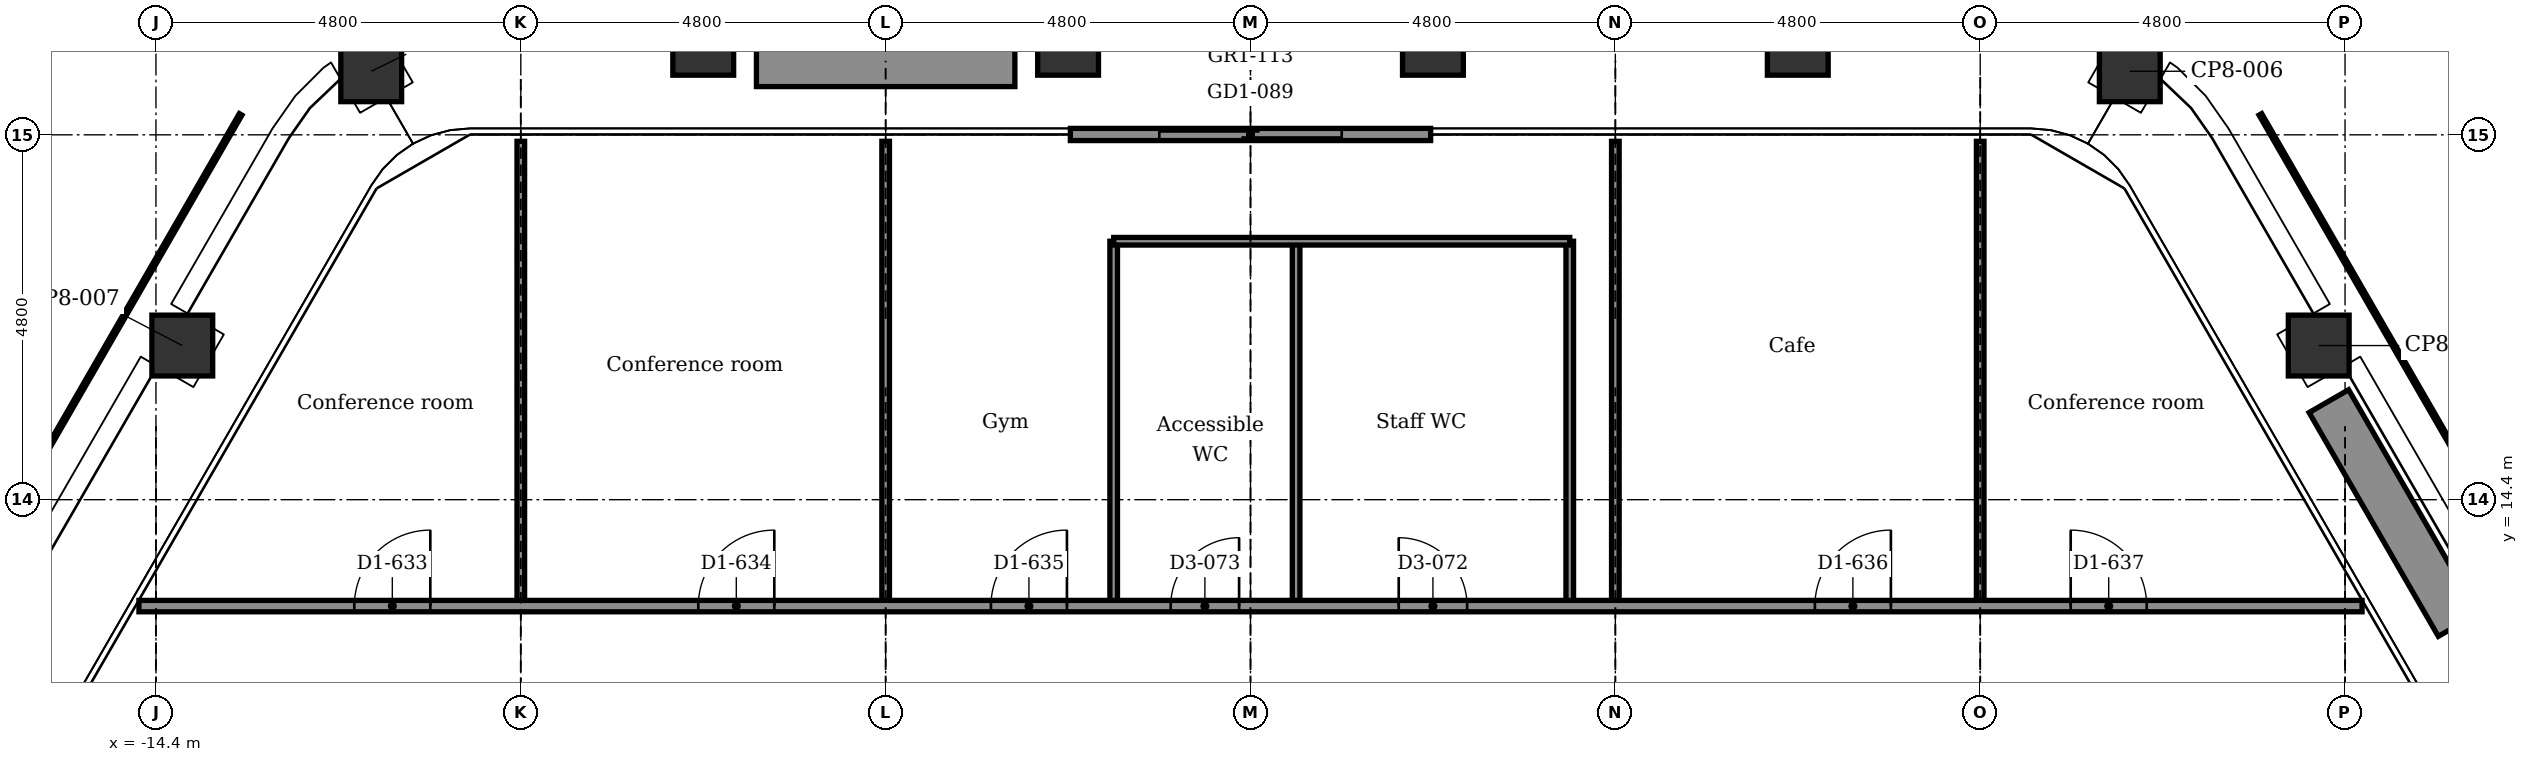
"""IFC4 building model, lengths in metres.
Left out: names, types, materials, properties, quantities, classifications, styles, units other than length and angle.
Written with IfcOpenShell. Run it as: python <this file> out.ifc"""

import sys

from ifc_helpers import new_model, si_unit, direction, frame, frame_2d, origin, origin_2d, place, context, subcontext, project, spatial, rectangle, extrude, element, fill, save


model = new_model("IFC4")
c1 = context("Model", 3, precision=1e-05, world=origin(), true_north=direction((0.0, 1.0)))
c2 = subcontext(c1, "Body", "Model", "MODEL_VIEW")
j1 = project(units=[si_unit("LENGTHUNIT", "METRE"), si_unit("PLANEANGLEUNIT", "RADIAN")], contexts=[c1])
p1 = place(None, origin())
s1 = spatial("IfcSite", under=j1, at=p1, CompositionType="ELEMENT")
p2 = place(p1, origin())
s2 = spatial("IfcBuilding", under=s1, at=p2, CompositionType="ELEMENT")
p3 = place(p2, frame((0.0, 0.0, 222.8)))
s3 = spatial("IfcBuildingStorey", under=s2, at=p3, CompositionType="ELEMENT", Elevation=222.8)
for number, where, z_axis, x_axis in (
    (1, (-11.568, 20.036, -0.15), (0.0, 0.0, 1.0), (0.866, 0.5, 0.0)),
    (2, (-7.2, 20.385, -0.15), (0.0, 0.0, 1.0), (1.0, 0.0, 0.0)),
    (3, (-2.4, 20.385, -0.15), (0.0, 0.0, 1.0), (1.0, 0.0, 0.0)),
    (4, (2.4, 20.385, -0.15), (0.0, 0.0, 1.0), (1.0, 0.0, 0.0)),
    (5, (7.2, 20.385, -0.15), (0.0, 0.0, 1.0), (1.0, 0.0, 0.0)),
    (6, (11.568, 20.036, -0.15), (0.0, 0.0, 1.0), (0.5, 0.866, 0.0)),
    (7, (14.054, 16.428, -0.15), (0.0, 0.0, 1.0), (0.866, 0.5, 0.0)),
    (8, (-14.054, 16.428, -0.15), (0.0, 0.0, 1.0), (0.5, 0.866, 0.0)),
):
    element("IfcColumn", number, at=place(p3, frame(where, z_axis=z_axis, x_axis=x_axis)), inside=s3, PredefinedType="COLUMN", context=c2, shape_type="SweptSolid", body=[
        extrude(rectangle(XDim=0.8, YDim=0.8, at=origin_2d()), origin(), (0.0, 0.0, 1.0), 3.9),
    ])
p4 = place(p3, frame((-2.37, 19.205, 0.0), z_axis=(0.0, 0.0, 1.0), x_axis=(1.0, 0.0, 0.0)))
e9 = element("IfcWall", 9, at=p4, inside=s3, PredefinedType="PARTITIONING", context=c2, shape_type="SweptSolid", body=[
    extrude(rectangle(XDim=4.74, YDim=0.16, at=frame_2d((2.37, 0.0))), origin(), (0.0, 0.0, 1.0), 3.75),
])
p5 = place(p4, frame((1.17, 0.0, 0.0)))
e10 = element("IfcOpeningElement", 10, at=p5, cuts=e9, PredefinedType="OPENING", context=c2, shape_type="SweptSolid", body=[
    extrude(rectangle(XDim=2.4, YDim=2.4, at=frame_2d((1.2, 1.2))), frame((0.0, 0.09, 0.0), z_axis=(0.0, -1.0, 0.0), x_axis=(1.0, 0.0, 0.0)), (0.0, 0.0, 1.0), 0.18),
])
p6 = place(p3, frame((-6.5, 20.135, 0.0), z_axis=(0.0, 0.0, 1.0), x_axis=(1.0, 0.0, 0.0)))
e11 = element("IfcWall", 11, at=p6, inside=s3, PredefinedType="USERDEFINED", context=c2, shape_type="SweptSolid", body=[
    extrude(rectangle(XDim=3.4, YDim=0.6, at=frame_2d((1.7, 0.0))), origin(), (0.0, 0.0, 1.0), 0.7),
])
p7 = place(p3, frame((14.187, 15.697, 0.0), z_axis=(0.0, 0.0, 1.0), x_axis=(0.499977295307, -0.866038511948, 0.0)))
e12 = element("IfcWall", 12, at=p7, inside=s3, PredefinedType="USERDEFINED", context=c2, shape_type="SweptSolid", body=[
    extrude(rectangle(XDim=3.4, YDim=0.6, at=frame_2d((1.7, 0.0))), origin(), (0.0, 0.0, 1.0), 0.7),
])
for number, where, z_axis, x_axis in (
    (13, (9.6, 13.0, 0.0), (0.0, 0.0, 1.0), (0.0, 1.0, 0.0)),
    (14, (4.8, 13.0, 0.0), (0.0, 0.0, 1.0), (0.0, 1.0, 0.0)),
):
    element("IfcWall", number, at=place(p3, frame(where, z_axis=z_axis, x_axis=x_axis)), inside=s3, PredefinedType="PARTITIONING", context=c2, shape_type="SweptSolid", body=[
        extrude(rectangle(XDim=6.115, YDim=0.1, at=frame_2d((3.057, 0.0))), origin(), (0.0, 0.0, 1.0), 3.217),
    ])
for number, where, z_axis, x_axis in (
    (15, (4.2, 13.0, 0.0), (0.0, 0.0, 1.0), (0.0, 1.0, 0.0)),
    (16, (0.6, 13.0, 0.0), (0.0, 0.0, 1.0), (0.0, 1.0, 0.0)),
    (17, (-1.8, 13.0, 0.0), (0.0, 0.0, 1.0), (0.0, 1.0, 0.0)),
):
    element("IfcWall", number, at=place(p3, frame(where, z_axis=z_axis, x_axis=x_axis)), inside=s3, PredefinedType="PARTITIONING", context=c2, shape_type="SweptSolid", body=[
        extrude(rectangle(XDim=4.8, YDim=0.1, at=frame_2d((2.4, 0.0))), origin(), (0.0, 0.0, 1.0), 3.75),
    ])
p8 = place(p3, frame((-4.8, 13.0, 0.0), z_axis=(0.0, 0.0, 1.0), x_axis=(0.0, 1.0, 0.0)))
e18 = element("IfcWall", 18, at=p8, inside=s3, PredefinedType="PARTITIONING", context=c2, shape_type="SweptSolid", body=[
    extrude(rectangle(XDim=6.115, YDim=0.1, at=frame_2d((3.057, 0.0))), origin(), (0.0, 0.0, 1.0), 3.217),
])
p9 = place(p3, frame((-9.6, 13.0, 0.0), z_axis=(0.0, 0.0, 1.0), x_axis=(0.0, 1.0, 0.0)))
e19 = element("IfcWall", 19, at=p9, inside=s3, PredefinedType="PARTITIONING", context=c2, shape_type="SweptSolid", body=[
    extrude(rectangle(XDim=6.115, YDim=0.1, at=frame_2d((3.057, 0.0))), origin(), (0.0, 0.0, 1.0), 3.293),
])
p10 = place(p3, frame((-14.624, 13.0, 0.0), z_axis=(0.0, 0.0, 1.0), x_axis=(1.0, 0.0, 0.0)))
e20 = element("IfcWall", 20, at=p10, inside=s3, PredefinedType="PARTITIONING", context=c2, shape_type="SweptSolid", body=[
    extrude(rectangle(XDim=29.248, YDim=0.15, at=frame_2d((14.624, 0.0))), origin(), (0.0, 0.0, 1.0), 3.75),
])
p11 = place(p10, frame((2.833, 0.0, 0.0)))
e21 = element("IfcOpeningElement", 21, at=p11, cuts=e20, PredefinedType="OPENING", context=c2, shape_type="SweptSolid", body=[
    extrude(rectangle(XDim=1.0, YDim=2.1, at=frame_2d((0.5, 1.05))), frame((0.0, 0.085, 0.0), z_axis=(0.0, -1.0, 0.0), x_axis=(1.0, 0.0, 0.0)), (0.0, 0.0, 1.0), 0.17),
])
p12 = place(p10, frame((7.359, 0.0, 0.0)))
e22 = element("IfcOpeningElement", 22, at=p12, cuts=e20, PredefinedType="OPENING", context=c2, shape_type="SweptSolid", body=[
    extrude(rectangle(XDim=1.0, YDim=2.1, at=frame_2d((0.5, 1.05))), frame((0.0, 0.085, 0.0), z_axis=(0.0, -1.0, 0.0), x_axis=(1.0, 0.0, 0.0)), (0.0, 0.0, 1.0), 0.17),
])
p13 = place(p10, frame((11.209, 0.0, 0.0)))
e23 = element("IfcOpeningElement", 23, at=p13, cuts=e20, PredefinedType="OPENING", context=c2, shape_type="SweptSolid", body=[
    extrude(rectangle(XDim=1.0, YDim=2.1, at=frame_2d((0.5, 1.05))), frame((0.0, 0.085, 0.0), z_axis=(0.0, -1.0, 0.0), x_axis=(1.0, 0.0, 0.0)), (0.0, 0.0, 1.0), 0.17),
])
p14 = place(p10, frame((22.049, 0.0, 0.0)))
e24 = element("IfcOpeningElement", 24, at=p14, cuts=e20, PredefinedType="OPENING", context=c2, shape_type="SweptSolid", body=[
    extrude(rectangle(XDim=1.0, YDim=2.1, at=frame_2d((0.5, 1.05))), frame((0.0, 0.085, 0.0), z_axis=(0.0, -1.0, 0.0), x_axis=(1.0, 0.0, 0.0)), (0.0, 0.0, 1.0), 0.17),
])
p15 = place(p10, frame((25.414, 0.0, 0.0)))
e25 = element("IfcOpeningElement", 25, at=p15, cuts=e20, PredefinedType="OPENING", context=c2, shape_type="SweptSolid", body=[
    extrude(rectangle(XDim=1.0, YDim=2.1, at=frame_2d((0.5, 1.05))), frame((0.0, 0.085, 0.0), z_axis=(0.0, -1.0, 0.0), x_axis=(1.0, 0.0, 0.0)), (0.0, 0.0, 1.0), 0.17),
])
p16 = place(p10, frame((16.574, 0.0, 0.0)))
e26 = element("IfcOpeningElement", 26, at=p16, cuts=e20, PredefinedType="OPENING", context=c2, shape_type="SweptSolid", body=[
    extrude(rectangle(XDim=0.9, YDim=2.1, at=frame_2d((0.45, 1.05))), frame((0.0, 0.085, 0.0), z_axis=(0.0, -1.0, 0.0), x_axis=(1.0, 0.0, 0.0)), (0.0, 0.0, 1.0), 0.17),
])
p17 = place(p10, frame((13.574, 0.0, 0.0)))
e27 = element("IfcOpeningElement", 27, at=p17, cuts=e20, PredefinedType="OPENING", context=c2, shape_type="SweptSolid", body=[
    extrude(rectangle(XDim=0.9, YDim=2.1, at=frame_2d((0.45, 1.05))), frame((0.0, 0.085, 0.0), z_axis=(0.0, -1.0, 0.0), x_axis=(1.0, 0.0, 0.0)), (0.0, 0.0, 1.0), 0.17),
])
p18 = place(p3, frame((-1.8, 17.8, 0.0), z_axis=(0.0, 0.0, 1.0), x_axis=(1.0, 0.0, 0.0)))
e28 = element("IfcWall", 28, at=p18, inside=s3, PredefinedType="PARTITIONING", context=c2, shape_type="SweptSolid", body=[
    extrude(rectangle(XDim=6.0, YDim=0.1, at=frame_2d((3.0, 0.0))), origin(), (0.0, 0.0, 1.0), 3.75),
])
p19 = place(p5, origin())
e29 = element("IfcDoor", 29, at=p19, inside=s3, OperationType="DOUBLE_DOOR_SLIDING", PredefinedType="DOOR", context=c2, shape_type="SweptSolid", body=[
    extrude(rectangle(XDim=2.4, YDim=2.4, at=frame_2d((1.2, 1.2))), frame((0.0, 0.025, 0.0), z_axis=(0.0, -1.0, 0.0), x_axis=(1.0, 0.0, 0.0)), (0.0, 0.0, 1.0), 0.05),
])
fill(e10, e29)
p20 = place(p11, origin())
e30 = element("IfcDoor", 30, at=p20, inside=s3, OperationType="SINGLE_SWING_RIGHT", PredefinedType="DOOR", context=c2, shape_type="SweptSolid", body=[
    extrude(rectangle(XDim=1.0, YDim=2.1, at=frame_2d((0.5, 1.05))), frame((0.0, 0.025, 0.0), z_axis=(0.0, -1.0, 0.0), x_axis=(1.0, 0.0, 0.0)), (0.0, 0.0, 1.0), 0.05),
])
fill(e21, e30)
p21 = place(p12, origin())
e31 = element("IfcDoor", 31, at=p21, inside=s3, OperationType="SINGLE_SWING_RIGHT", PredefinedType="DOOR", context=c2, shape_type="SweptSolid", body=[
    extrude(rectangle(XDim=1.0, YDim=2.1, at=frame_2d((0.5, 1.05))), frame((0.0, 0.025, 0.0), z_axis=(0.0, -1.0, 0.0), x_axis=(1.0, 0.0, 0.0)), (0.0, 0.0, 1.0), 0.05),
])
fill(e22, e31)
p22 = place(p13, origin())
e32 = element("IfcDoor", 32, at=p22, inside=s3, OperationType="SINGLE_SWING_RIGHT", PredefinedType="DOOR", context=c2, shape_type="SweptSolid", body=[
    extrude(rectangle(XDim=1.0, YDim=2.1, at=frame_2d((0.5, 1.05))), frame((0.0, 0.025, 0.0), z_axis=(0.0, -1.0, 0.0), x_axis=(1.0, 0.0, 0.0)), (0.0, 0.0, 1.0), 0.05),
])
fill(e23, e32)
p23 = place(p14, origin())
e33 = element("IfcDoor", 33, at=p23, inside=s3, OperationType="SINGLE_SWING_RIGHT", PredefinedType="DOOR", context=c2, shape_type="SweptSolid", body=[
    extrude(rectangle(XDim=1.0, YDim=2.1, at=frame_2d((0.5, 1.05))), frame((0.0, 0.025, 0.0), z_axis=(0.0, -1.0, 0.0), x_axis=(1.0, 0.0, 0.0)), (0.0, 0.0, 1.0), 0.05),
])
fill(e24, e33)
p24 = place(p15, origin())
e34 = element("IfcDoor", 34, at=p24, inside=s3, OperationType="SINGLE_SWING_LEFT", PredefinedType="DOOR", context=c2, shape_type="SweptSolid", body=[
    extrude(rectangle(XDim=1.0, YDim=2.1, at=frame_2d((0.5, 1.05))), frame((0.0, 0.025, 0.0), z_axis=(0.0, -1.0, 0.0), x_axis=(1.0, 0.0, 0.0)), (0.0, 0.0, 1.0), 0.05),
])
fill(e25, e34)
p25 = place(p16, origin())
e35 = element("IfcDoor", 35, at=p25, inside=s3, OperationType="SINGLE_SWING_LEFT", PredefinedType="DOOR", context=c2, shape_type="SweptSolid", body=[
    extrude(rectangle(XDim=0.9, YDim=2.1, at=frame_2d((0.45, 1.05))), frame((0.0, 0.025, 0.0), z_axis=(0.0, -1.0, 0.0), x_axis=(1.0, 0.0, 0.0)), (0.0, 0.0, 1.0), 0.05),
])
fill(e26, e35)
p26 = place(p17, origin())
e36 = element("IfcDoor", 36, at=p26, inside=s3, OperationType="SINGLE_SWING_RIGHT", PredefinedType="DOOR", context=c2, shape_type="SweptSolid", body=[
    extrude(rectangle(XDim=0.9, YDim=2.1, at=frame_2d((0.45, 1.05))), frame((0.0, 0.025, 0.0), z_axis=(0.0, -1.0, 0.0), x_axis=(1.0, 0.0, 0.0)), (0.0, 0.0, 1.0), 0.05),
])
fill(e27, e36)
save(model, sys.argv[1])
